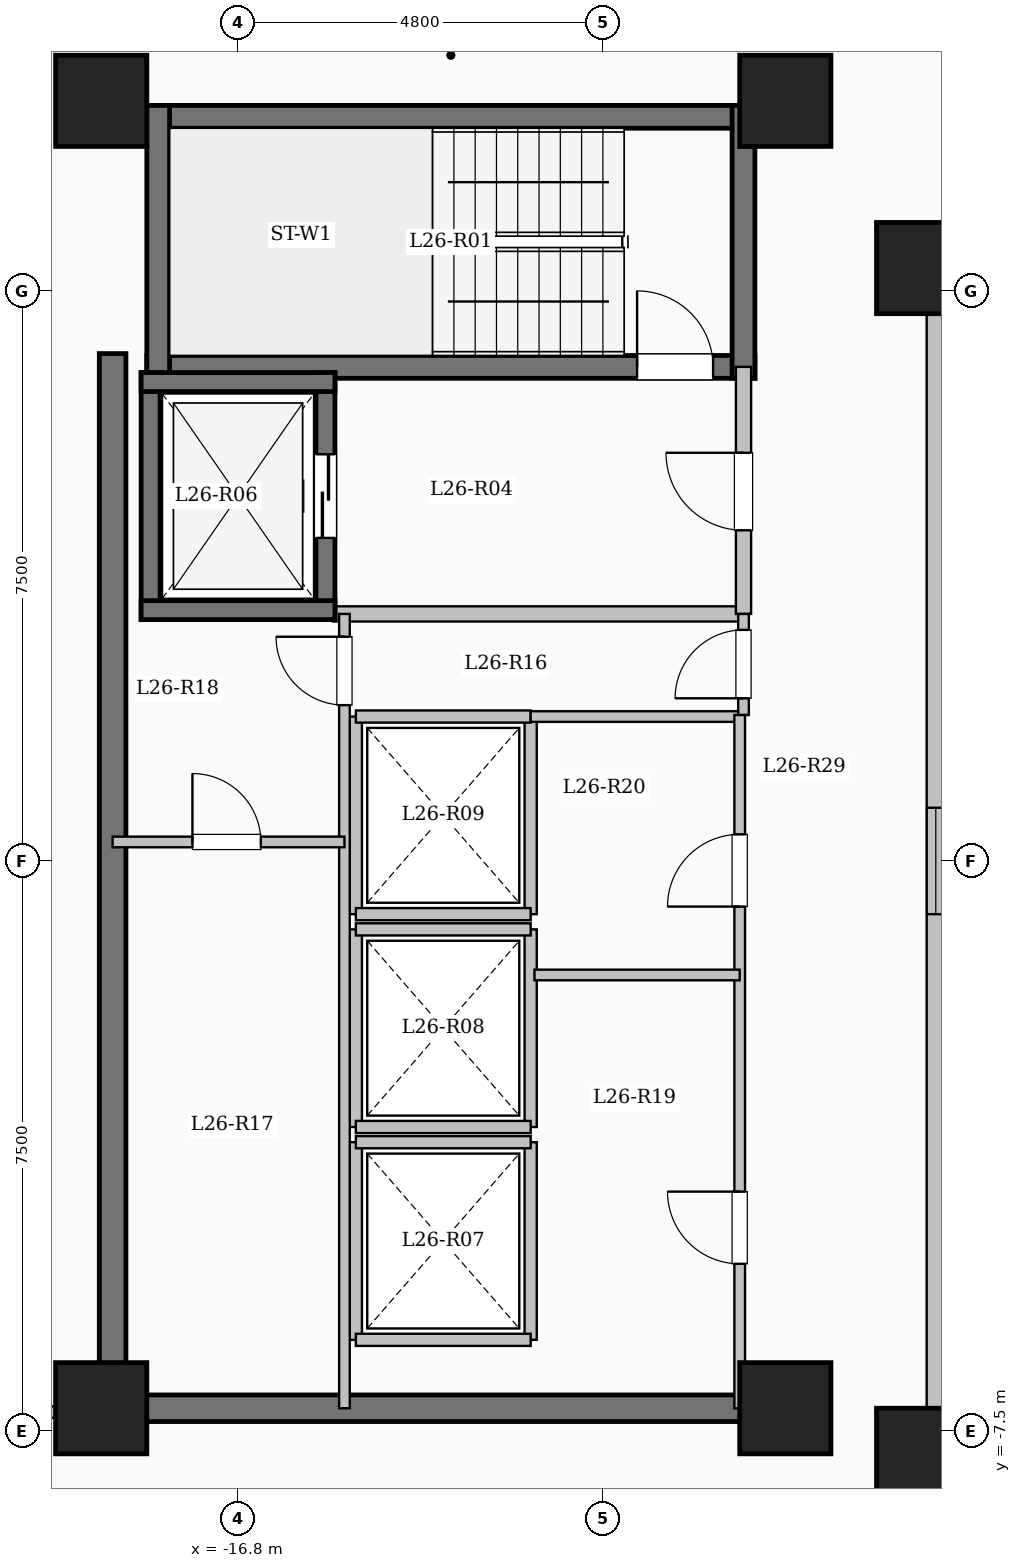
"""IFC4 building model, lengths in metres.
Left out: names, types, materials, properties, quantities, classifications, styles, units other than length and angle.
Written with IfcOpenShell. Run it as: python <this file> out.ifc"""

import sys

from ifc_helpers import new_model, si_unit, direction, frame, frame_2d, origin, origin_2d, place, context, subcontext, project, spatial, rectangle, extrude, element, fill, save


model = new_model("IFC4")
c1 = context("Model", 3, precision=1e-05, world=origin(), true_north=direction((0.0, 1.0)))
c2 = subcontext(c1, "Body", "Model", "MODEL_VIEW")
j1 = project(units=[si_unit("LENGTHUNIT", "METRE"), si_unit("PLANEANGLEUNIT", "RADIAN")], contexts=[c1])
p1 = place(None, origin())
s1 = spatial("IfcSite", under=j1, at=p1, CompositionType="ELEMENT")
p2 = place(p1, origin())
s2 = spatial("IfcBuilding", under=s1, at=p2, CompositionType="ELEMENT")
p3 = place(p2, frame((0.0, 0.0, 98.4)))
s3 = spatial("IfcBuildingStorey", under=s2, at=p3, CompositionType="ELEMENT", Elevation=98.4)
for number, where, z_axis, x_axis in (
    (1, (-7.8, -7.8, 0.0), (0.0, 0.0, 1.0), (1.0, 0.0, 0.0)),
    (2, (-7.8, 7.8, 0.0), (0.0, 0.0, 1.0), (1.0, 0.0, 0.0)),
    (3, (-9.6, -7.2, 0.0), (0.0, 0.0, 1.0), (1.0, 0.0, 0.0)),
    (4, (-9.6, 10.0, 0.0), (0.0, 0.0, 1.0), (1.0, 0.0, 0.0)),
    (5, (-18.6, -7.2, 0.0), (0.0, 0.0, 1.0), (1.0, 0.0, 0.0)),
    (6, (-18.6, 10.0, 0.0), (0.0, 0.0, 1.0), (1.0, 0.0, 0.0)),
):
    element("IfcColumn", number, at=place(p3, frame(where, z_axis=z_axis, x_axis=x_axis)), inside=s3, PredefinedType="COLUMN", context=c2, shape_type="SweptSolid", body=[
        extrude(rectangle(XDim=1.2, YDim=1.2, at=origin_2d()), origin(), (0.0, 0.0, 1.0), 3.35),
    ])
p4 = place(p3, frame((-7.62, -7.62, 0.0), z_axis=(0.0, 0.0, 1.0), x_axis=(1.0, 0.0, 0.0)))
e7 = element("IfcWall", 7, at=p4, inside=s3, PredefinedType="SOLIDWALL", context=c2, shape_type="SweptSolid", body=[
    extrude(rectangle(XDim=15.24, YDim=0.24, at=frame_2d((7.62, 0.0))), origin(), (0.0, 0.0, 1.0), 3.1),
])
p5 = place(p4, frame((6.92, 0.0, 0.95)))
e8 = element("IfcOpeningElement", 8, at=p5, cuts=e7, PredefinedType="OPENING", context=c2, shape_type="SweptSolid", body=[
    extrude(rectangle(XDim=1.4, YDim=1.5, at=frame_2d((0.7, 0.75))), frame((0.0, 0.13, 0.0), z_axis=(0.0, -1.0, 0.0), x_axis=(1.0, 0.0, 0.0)), (0.0, 0.0, 1.0), 0.26),
])
p6 = place(p3, frame((7.62, 7.62, 0.0), z_axis=(0.0, 0.0, 1.0), x_axis=(-1.0, 0.0, 0.0)))
e9 = element("IfcWall", 9, at=p6, inside=s3, PredefinedType="SOLIDWALL", context=c2, shape_type="SweptSolid", body=[
    extrude(rectangle(XDim=15.24, YDim=0.24, at=frame_2d((7.62, 0.0))), origin(), (0.0, 0.0, 1.0), 3.1),
])
p7 = place(p6, frame((6.92, 0.0, 0.95)))
e10 = element("IfcOpeningElement", 10, at=p7, cuts=e9, PredefinedType="OPENING", context=c2, shape_type="SweptSolid", body=[
    extrude(rectangle(XDim=1.4, YDim=1.5, at=frame_2d((0.7, 0.75))), frame((0.0, 0.13, 0.0), z_axis=(0.0, -1.0, 0.0), x_axis=(1.0, 0.0, 0.0)), (0.0, 0.0, 1.0), 0.26),
])
p8 = place(p3, frame((-7.62, 7.62, 0.0), z_axis=(0.0, 0.0, 1.0), x_axis=(0.0, -1.0, 0.0)))
e11 = element("IfcWall", 11, at=p8, inside=s3, PredefinedType="SOLIDWALL", context=c2, shape_type="SweptSolid", body=[
    extrude(rectangle(XDim=15.24, YDim=0.24, at=frame_2d((7.62, 0.0))), origin(), (0.0, 0.0, 1.0), 3.1),
])
p9 = place(p8, frame((6.92, 0.0, 0.95)))
e12 = element("IfcOpeningElement", 12, at=p9, cuts=e11, PredefinedType="OPENING", context=c2, shape_type="SweptSolid", body=[
    extrude(rectangle(XDim=1.4, YDim=1.5, at=frame_2d((0.7, 0.75))), frame((0.0, 0.13, 0.0), z_axis=(0.0, -1.0, 0.0), x_axis=(1.0, 0.0, 0.0)), (0.0, 0.0, 1.0), 0.26),
])
p10 = place(p3, frame((-18.0, 9.79, 0.0), z_axis=(0.0, 0.0, 1.0), x_axis=(1.0, 0.0, 0.0)))
e13 = element("IfcWall", 13, at=p10, inside=s3, PredefinedType="SHEAR", context=c2, shape_type="SweptSolid", body=[
    extrude(rectangle(XDim=8.0, YDim=0.3, at=frame_2d((4.0, 0.0))), origin(), (0.0, 0.0, 1.0), 3.35),
])
p11 = place(p3, frame((-18.0, 6.5, 0.0), z_axis=(0.0, 0.0, 1.0), x_axis=(1.0, 0.0, 0.0)))
e14 = element("IfcWall", 14, at=p11, inside=s3, PredefinedType="SHEAR", context=c2, shape_type="SweptSolid", body=[
    extrude(rectangle(XDim=8.0, YDim=0.3, at=frame_2d((4.0, 0.0))), origin(), (0.0, 0.0, 1.0), 3.35),
])
p12 = place(p11, frame((6.45, 0.0, 0.0)))
e15 = element("IfcOpeningElement", 15, at=p12, cuts=e14, PredefinedType="OPENING", context=c2, shape_type="SweptSolid", body=[
    extrude(rectangle(XDim=1.0, YDim=2.15, at=frame_2d((0.5, 1.075))), frame((0.0, 0.16, 0.0), z_axis=(0.0, -1.0, 0.0), x_axis=(1.0, 0.0, 0.0)), (0.0, 0.0, 1.0), 0.32),
])
for number, where, z_axis, x_axis in (
    (16, (-17.85, 6.35, 0.0), (0.0, 0.0, 1.0), (0.0, 1.0, 0.0)),
    (17, (-10.15, 6.35, 0.0), (0.0, 0.0, 1.0), (0.0, 1.0, 0.0)),
):
    element("IfcWall", number, at=place(p3, frame(where, z_axis=z_axis, x_axis=x_axis)), inside=s3, PredefinedType="SHEAR", context=c2, shape_type="SweptSolid", body=[
        extrude(rectangle(XDim=3.59, YDim=0.3, at=frame_2d((1.795, 0.0))), origin(), (0.0, 0.0, 1.0), 3.35),
    ])
p13 = place(p3, frame((-15.55, 3.25, 0.0), z_axis=(0.0, 0.0, 1.0), x_axis=(1.0, 0.0, 0.0)))
e18 = element("IfcWall", 18, at=p13, inside=s3, PredefinedType="SOLIDWALL", context=c2, shape_type="SweptSolid", body=[
    extrude(rectangle(XDim=5.4, YDim=0.2, at=frame_2d((2.7, 0.0))), origin(), (0.0, 0.0, 1.0), 3.1),
])
p14 = place(p3, frame((-10.15, 3.25, 0.0), z_axis=(0.0, 0.0, 1.0), x_axis=(0.0, 1.0, 0.0)))
e19 = element("IfcWall", 19, at=p14, inside=s3, PredefinedType="SOLIDWALL", context=c2, shape_type="SweptSolid", body=[
    extrude(rectangle(XDim=3.25, YDim=0.2, at=frame_2d((1.625, 0.0))), origin(), (0.0, 0.0, 1.0), 3.1),
])
p15 = place(p14, frame((1.1, 0.0, 0.0)))
e20 = element("IfcOpeningElement", 20, at=p15, cuts=e19, PredefinedType="OPENING", context=c2, shape_type="SweptSolid", body=[
    extrude(rectangle(XDim=1.02, YDim=2.15, at=frame_2d((0.51, 1.075))), frame((0.0, 0.11, 0.0), z_axis=(0.0, -1.0, 0.0), x_axis=(1.0, 0.0, 0.0)), (0.0, 0.0, 1.0), 0.22),
])
p16 = place(p3, frame((-17.95, 3.175, 0.0), z_axis=(0.0, 0.0, 1.0), x_axis=(0.0, 1.0, 0.0)))
e21 = element("IfcWall", 21, at=p16, inside=s3, PredefinedType="SHEAR", context=c2, shape_type="SweptSolid", body=[
    extrude(rectangle(XDim=3.25, YDim=0.25, at=frame_2d((1.625, 0.0))), origin(), (0.0, 0.0, 1.0), 3.35),
])
p17 = place(p3, frame((-15.65, 3.175, 0.0), z_axis=(0.0, 0.0, 1.0), x_axis=(0.0, 1.0, 0.0)))
e22 = element("IfcWall", 22, at=p17, inside=s3, PredefinedType="SHEAR", context=c2, shape_type="SweptSolid", body=[
    extrude(rectangle(XDim=3.25, YDim=0.25, at=frame_2d((1.625, 0.0))), origin(), (0.0, 0.0, 1.0), 3.35),
])
p18 = place(p17, frame((1.075, 0.0, 0.0)))
e23 = element("IfcOpeningElement", 23, at=p18, cuts=e22, PredefinedType="OPENING", context=c2, shape_type="SweptSolid", body=[
    extrude(rectangle(XDim=1.1, YDim=2.15, at=frame_2d((0.55, 1.075))), frame((0.0, 0.135, 0.0), z_axis=(0.0, -1.0, 0.0), x_axis=(1.0, 0.0, 0.0)), (0.0, 0.0, 1.0), 0.27),
])
for number, where, z_axis, x_axis in (
    (24, (-18.075, 3.3, 0.0), (0.0, 0.0, 1.0), (1.0, 0.0, 0.0)),
    (25, (-18.075, 6.3, 0.0), (0.0, 0.0, 1.0), (1.0, 0.0, 0.0)),
):
    element("IfcWall", number, at=place(p3, frame(where, z_axis=z_axis, x_axis=x_axis)), inside=s3, PredefinedType="SHEAR", context=c2, shape_type="SweptSolid", body=[
        extrude(rectangle(XDim=2.55, YDim=0.25, at=frame_2d((1.275, 0.0))), origin(), (0.0, 0.0, 1.0), 3.35),
    ])
for number, where, z_axis, x_axis in (
    (26, (-15.25, -6.3, 0.0), (0.0, 0.0, 1.0), (0.0, 1.0, 0.0)),
    (27, (-12.95, -6.3, 0.0), (0.0, 0.0, 1.0), (0.0, 1.0, 0.0)),
):
    element("IfcWall", number, at=place(p3, frame(where, z_axis=z_axis, x_axis=x_axis)), inside=s3, PredefinedType="SOLIDWALL", context=c2, shape_type="SweptSolid", body=[
        extrude(rectangle(XDim=2.6, YDim=0.16, at=frame_2d((1.3, 0.0))), origin(), (0.0, 0.0, 1.0), 3.1),
    ])
for number, where, z_axis, x_axis in (
    (28, (-15.25, -6.3, 0.0), (0.0, 0.0, 1.0), (1.0, 0.0, 0.0)),
    (29, (-15.25, -3.7, 0.0), (0.0, 0.0, 1.0), (1.0, 0.0, 0.0)),
):
    element("IfcWall", number, at=place(p3, frame(where, z_axis=z_axis, x_axis=x_axis)), inside=s3, PredefinedType="SOLIDWALL", context=c2, shape_type="SweptSolid", body=[
        extrude(rectangle(XDim=2.3, YDim=0.16, at=frame_2d((1.15, 0.0))), origin(), (0.0, 0.0, 1.0), 3.1),
    ])
for number, where, z_axis, x_axis in (
    (30, (-15.25, -3.5, 0.0), (0.0, 0.0, 1.0), (0.0, 1.0, 0.0)),
    (31, (-12.95, -3.5, 0.0), (0.0, 0.0, 1.0), (0.0, 1.0, 0.0)),
):
    element("IfcWall", number, at=place(p3, frame(where, z_axis=z_axis, x_axis=x_axis)), inside=s3, PredefinedType="SOLIDWALL", context=c2, shape_type="SweptSolid", body=[
        extrude(rectangle(XDim=2.6, YDim=0.16, at=frame_2d((1.3, 0.0))), origin(), (0.0, 0.0, 1.0), 3.1),
    ])
for number, where, z_axis, x_axis in (
    (32, (-15.25, -3.5, 0.0), (0.0, 0.0, 1.0), (1.0, 0.0, 0.0)),
    (33, (-15.25, -0.9, 0.0), (0.0, 0.0, 1.0), (1.0, 0.0, 0.0)),
):
    element("IfcWall", number, at=place(p3, frame(where, z_axis=z_axis, x_axis=x_axis)), inside=s3, PredefinedType="SOLIDWALL", context=c2, shape_type="SweptSolid", body=[
        extrude(rectangle(XDim=2.3, YDim=0.16, at=frame_2d((1.15, 0.0))), origin(), (0.0, 0.0, 1.0), 3.1),
    ])
for number, where, z_axis, x_axis in (
    (34, (-15.25, -0.7, 0.0), (0.0, 0.0, 1.0), (0.0, 1.0, 0.0)),
    (35, (-12.95, -0.7, 0.0), (0.0, 0.0, 1.0), (0.0, 1.0, 0.0)),
):
    element("IfcWall", number, at=place(p3, frame(where, z_axis=z_axis, x_axis=x_axis)), inside=s3, PredefinedType="SOLIDWALL", context=c2, shape_type="SweptSolid", body=[
        extrude(rectangle(XDim=2.6, YDim=0.16, at=frame_2d((1.3, 0.0))), origin(), (0.0, 0.0, 1.0), 3.1),
    ])
for number, where, z_axis, x_axis in (
    (36, (-15.25, -0.7, 0.0), (0.0, 0.0, 1.0), (1.0, 0.0, 0.0)),
    (37, (-15.25, 1.9, 0.0), (0.0, 0.0, 1.0), (1.0, 0.0, 0.0)),
):
    element("IfcWall", number, at=place(p3, frame(where, z_axis=z_axis, x_axis=x_axis)), inside=s3, PredefinedType="SOLIDWALL", context=c2, shape_type="SweptSolid", body=[
        extrude(rectangle(XDim=2.3, YDim=0.16, at=frame_2d((1.15, 0.0))), origin(), (0.0, 0.0, 1.0), 3.1),
    ])
p19 = place(p3, frame((-18.45, -7.375, 0.0), z_axis=(0.0, 0.0, 1.0), x_axis=(0.0, 1.0, 0.0)))
e38 = element("IfcWall", 38, at=p19, inside=s3, PredefinedType="SHEAR", context=c2, shape_type="SweptSolid", body=[
    extrude(rectangle(XDim=14.05, YDim=0.35, at=frame_2d((7.025, 0.0))), origin(), (0.0, 0.0, 1.0), 3.35),
])
p20 = place(p3, frame((-18.625, -7.2, 0.0), z_axis=(0.0, 0.0, 1.0), x_axis=(1.0, 0.0, 0.0)))
e39 = element("IfcWall", 39, at=p20, inside=s3, PredefinedType="SHEAR", context=c2, shape_type="SweptSolid", body=[
    extrude(rectangle(XDim=8.55, YDim=0.35, at=frame_2d((4.275, 0.0))), origin(), (0.0, 0.0, 1.0), 3.35),
])
p21 = place(p3, frame((-12.95, 1.9, 0.0), z_axis=(0.0, 0.0, 1.0), x_axis=(1.0, 0.0, 0.0)))
e40 = element("IfcWall", 40, at=p21, inside=s3, PredefinedType="PARTITIONING", context=c2, shape_type="SweptSolid", body=[
    extrude(rectangle(XDim=2.8, YDim=0.14, at=frame_2d((1.4, 0.0))), origin(), (0.0, 0.0, 1.0), 3.1),
])
p22 = place(p3, frame((-10.15, 1.92, 0.0), z_axis=(0.0, 0.0, 1.0), x_axis=(0.0, 1.0, 0.0)))
e41 = element("IfcWall", 41, at=p22, inside=s3, PredefinedType="PARTITIONING", context=c2, shape_type="SweptSolid", body=[
    extrude(rectangle(XDim=1.33, YDim=0.14, at=frame_2d((0.665, 0.0))), origin(), (0.0, 0.0, 1.0), 3.1),
])
p23 = place(p22, frame((0.22, 0.0, 0.0)))
e42 = element("IfcOpeningElement", 42, at=p23, cuts=e41, PredefinedType="OPENING", context=c2, shape_type="SweptSolid", body=[
    extrude(rectangle(XDim=0.9, YDim=2.08, at=frame_2d((0.45, 1.04))), frame((0.0, 0.08, 0.0), z_axis=(0.0, -1.0, 0.0), x_axis=(1.0, 0.0, 0.0)), (0.0, 0.0, 1.0), 0.16),
])
p24 = place(p3, frame((-15.4, -7.2, 0.0), z_axis=(0.0, 0.0, 1.0), x_axis=(0.0, 1.0, 0.0)))
e43 = element("IfcWall", 43, at=p24, inside=s3, PredefinedType="PARTITIONING", context=c2, shape_type="SweptSolid", body=[
    extrude(rectangle(XDim=10.45, YDim=0.14, at=frame_2d((5.225, 0.0))), origin(), (0.0, 0.0, 1.0), 3.1),
])
p25 = place(p24, frame((9.25, 0.0, 0.0)))
e44 = element("IfcOpeningElement", 44, at=p25, cuts=e43, PredefinedType="OPENING", context=c2, shape_type="SweptSolid", body=[
    extrude(rectangle(XDim=0.9, YDim=2.08, at=frame_2d((0.45, 1.04))), frame((0.0, 0.08, 0.0), z_axis=(0.0, -1.0, 0.0), x_axis=(1.0, 0.0, 0.0)), (0.0, 0.0, 1.0), 0.16),
])
p26 = place(p3, frame((-18.45, 0.25, 0.0), z_axis=(0.0, 0.0, 1.0), x_axis=(1.0, 0.0, 0.0)))
e45 = element("IfcWall", 45, at=p26, inside=s3, PredefinedType="PARTITIONING", context=c2, shape_type="SweptSolid", body=[
    extrude(rectangle(XDim=3.05, YDim=0.14, at=frame_2d((1.525, 0.0))), origin(), (0.0, 0.0, 1.0), 3.1),
])
p27 = place(p26, frame((1.05, 0.0, 0.0)))
e46 = element("IfcOpeningElement", 46, at=p27, cuts=e45, PredefinedType="OPENING", context=c2, shape_type="SweptSolid", body=[
    extrude(rectangle(XDim=0.9, YDim=2.08, at=frame_2d((0.45, 1.04))), frame((0.0, 0.08, 0.0), z_axis=(0.0, -1.0, 0.0), x_axis=(1.0, 0.0, 0.0)), (0.0, 0.0, 1.0), 0.16),
])
p28 = place(p3, frame((-10.2, -7.2, 0.0), z_axis=(0.0, 0.0, 1.0), x_axis=(0.0, 1.0, 0.0)))
e47 = element("IfcWall", 47, at=p28, inside=s3, PredefinedType="PARTITIONING", context=c2, shape_type="SweptSolid", body=[
    extrude(rectangle(XDim=9.12, YDim=0.14, at=frame_2d((4.56, 0.0))), origin(), (0.0, 0.0, 1.0), 3.1),
])
p29 = place(p28, frame((1.9, 0.0, 0.0)))
e48 = element("IfcOpeningElement", 48, at=p29, cuts=e47, PredefinedType="OPENING", context=c2, shape_type="SweptSolid", body=[
    extrude(rectangle(XDim=0.95, YDim=2.12, at=frame_2d((0.475, 1.06))), frame((0.0, 0.08, 0.0), z_axis=(0.0, -1.0, 0.0), x_axis=(1.0, 0.0, 0.0)), (0.0, 0.0, 1.0), 0.16),
])
p30 = place(p28, frame((6.6, 0.0, 0.0)))
e49 = element("IfcOpeningElement", 49, at=p30, cuts=e47, PredefinedType="OPENING", context=c2, shape_type="SweptSolid", body=[
    extrude(rectangle(XDim=0.95, YDim=2.12, at=frame_2d((0.475, 1.06))), frame((0.0, 0.08, 0.0), z_axis=(0.0, -1.0, 0.0), x_axis=(1.0, 0.0, 0.0)), (0.0, 0.0, 1.0), 0.16),
])
p31 = place(p3, frame((-12.9, -1.5, 0.0), z_axis=(0.0, 0.0, 1.0), x_axis=(1.0, 0.0, 0.0)))
e50 = element("IfcWall", 50, at=p31, inside=s3, PredefinedType="PARTITIONING", context=c2, shape_type="SweptSolid", body=[
    extrude(rectangle(XDim=2.7, YDim=0.14, at=frame_2d((1.35, 0.0))), origin(), (0.0, 0.0, 1.0), 3.1),
])
p32 = place(p3, frame((-26.88, -7.25, 0.0), z_axis=(0.0, 0.0, 1.0), x_axis=(1.0, 0.0, 0.0)))
e51 = element("IfcWall", 51, at=p32, inside=s3, PredefinedType="PARTITIONING", context=c2, shape_type="SweptSolid", body=[
    extrude(rectangle(XDim=8.43, YDim=0.15, at=frame_2d((4.215, 0.0))), origin(), (0.0, 0.0, 1.0), 3.1),
])
p33 = place(p32, frame((5.23, 0.0, 0.0)))
e52 = element("IfcOpeningElement", 52, at=p33, cuts=e51, PredefinedType="OPENING", context=c2, shape_type="SweptSolid", body=[
    extrude(rectangle(XDim=1.08, YDim=2.15, at=frame_2d((0.54, 1.075))), frame((0.0, 0.085, 0.0), z_axis=(0.0, -1.0, 0.0), x_axis=(1.0, 0.0, 0.0)), (0.0, 0.0, 1.0), 0.17),
])
p34 = place(p9, origin())
e53 = element("IfcWindow", 53, at=p34, inside=s3, PartitioningType="SINGLE_PANEL", PredefinedType="WINDOW", context=c2, shape_type="SweptSolid", body=[
    extrude(rectangle(XDim=1.4, YDim=1.5, at=frame_2d((0.7, 0.75))), frame((0.0, 0.03, 0.0), z_axis=(0.0, -1.0, 0.0), x_axis=(1.0, 0.0, 0.0)), (0.0, 0.0, 1.0), 0.06),
])
fill(e12, e53)
p35 = place(p12, origin())
e54 = element("IfcDoor", 54, at=p35, inside=s3, OperationType="SINGLE_SWING_LEFT", PredefinedType="DOOR", context=c2, shape_type="SweptSolid", body=[
    extrude(rectangle(XDim=1.0, YDim=2.15, at=frame_2d((0.5, 1.075))), frame((0.0, 0.025, 0.0), z_axis=(0.0, -1.0, 0.0), x_axis=(1.0, 0.0, 0.0)), (0.0, 0.0, 1.0), 0.05),
])
fill(e15, e54)
p36 = place(p15, origin())
e55 = element("IfcDoor", 55, at=p36, inside=s3, OperationType="SINGLE_SWING_RIGHT", PredefinedType="DOOR", context=c2, shape_type="SweptSolid", body=[
    extrude(rectangle(XDim=1.02, YDim=2.15, at=frame_2d((0.51, 1.075))), frame((0.0, 0.025, 0.0), z_axis=(0.0, -1.0, 0.0), x_axis=(1.0, 0.0, 0.0)), (0.0, 0.0, 1.0), 0.05),
])
fill(e20, e55)
p37 = place(p18, origin())
e56 = element("IfcDoor", 56, at=p37, inside=s3, OperationType="SLIDING_TO_LEFT", PredefinedType="DOOR", context=c2, shape_type="SweptSolid", body=[
    extrude(rectangle(XDim=1.1, YDim=2.15, at=frame_2d((0.55, 1.075))), frame((0.0, 0.025, 0.0), z_axis=(0.0, -1.0, 0.0), x_axis=(1.0, 0.0, 0.0)), (0.0, 0.0, 1.0), 0.05),
])
fill(e23, e56)
p38 = place(p23, origin())
e57 = element("IfcDoor", 57, at=p38, inside=s3, OperationType="SINGLE_SWING_LEFT", PredefinedType="DOOR", context=c2, shape_type="SweptSolid", body=[
    extrude(rectangle(XDim=0.9, YDim=2.08, at=frame_2d((0.45, 1.04))), frame((0.0, 0.025, 0.0), z_axis=(0.0, -1.0, 0.0), x_axis=(1.0, 0.0, 0.0)), (0.0, 0.0, 1.0), 0.05),
])
fill(e42, e57)
p39 = place(p25, origin())
e58 = element("IfcDoor", 58, at=p39, inside=s3, OperationType="SINGLE_SWING_RIGHT", PredefinedType="DOOR", context=c2, shape_type="SweptSolid", body=[
    extrude(rectangle(XDim=0.9, YDim=2.08, at=frame_2d((0.45, 1.04))), frame((0.0, 0.025, 0.0), z_axis=(0.0, -1.0, 0.0), x_axis=(1.0, 0.0, 0.0)), (0.0, 0.0, 1.0), 0.05),
])
fill(e44, e58)
p40 = place(p27, origin())
e59 = element("IfcDoor", 59, at=p40, inside=s3, OperationType="SINGLE_SWING_LEFT", PredefinedType="DOOR", context=c2, shape_type="SweptSolid", body=[
    extrude(rectangle(XDim=0.9, YDim=2.08, at=frame_2d((0.45, 1.04))), frame((0.0, 0.025, 0.0), z_axis=(0.0, -1.0, 0.0), x_axis=(1.0, 0.0, 0.0)), (0.0, 0.0, 1.0), 0.05),
])
fill(e46, e59)
p41 = place(p29, origin())
e60 = element("IfcDoor", 60, at=p41, inside=s3, OperationType="SINGLE_SWING_RIGHT", PredefinedType="DOOR", context=c2, shape_type="SweptSolid", body=[
    extrude(rectangle(XDim=0.95, YDim=2.12, at=frame_2d((0.475, 1.06))), frame((0.0, 0.025, 0.0), z_axis=(0.0, -1.0, 0.0), x_axis=(1.0, 0.0, 0.0)), (0.0, 0.0, 1.0), 0.05),
])
fill(e48, e60)
p42 = place(p30, origin())
e61 = element("IfcDoor", 61, at=p42, inside=s3, OperationType="SINGLE_SWING_LEFT", PredefinedType="DOOR", context=c2, shape_type="SweptSolid", body=[
    extrude(rectangle(XDim=0.95, YDim=2.12, at=frame_2d((0.475, 1.06))), frame((0.0, 0.025, 0.0), z_axis=(0.0, -1.0, 0.0), x_axis=(1.0, 0.0, 0.0)), (0.0, 0.0, 1.0), 0.05),
])
fill(e49, e61)
save(model, sys.argv[1])
